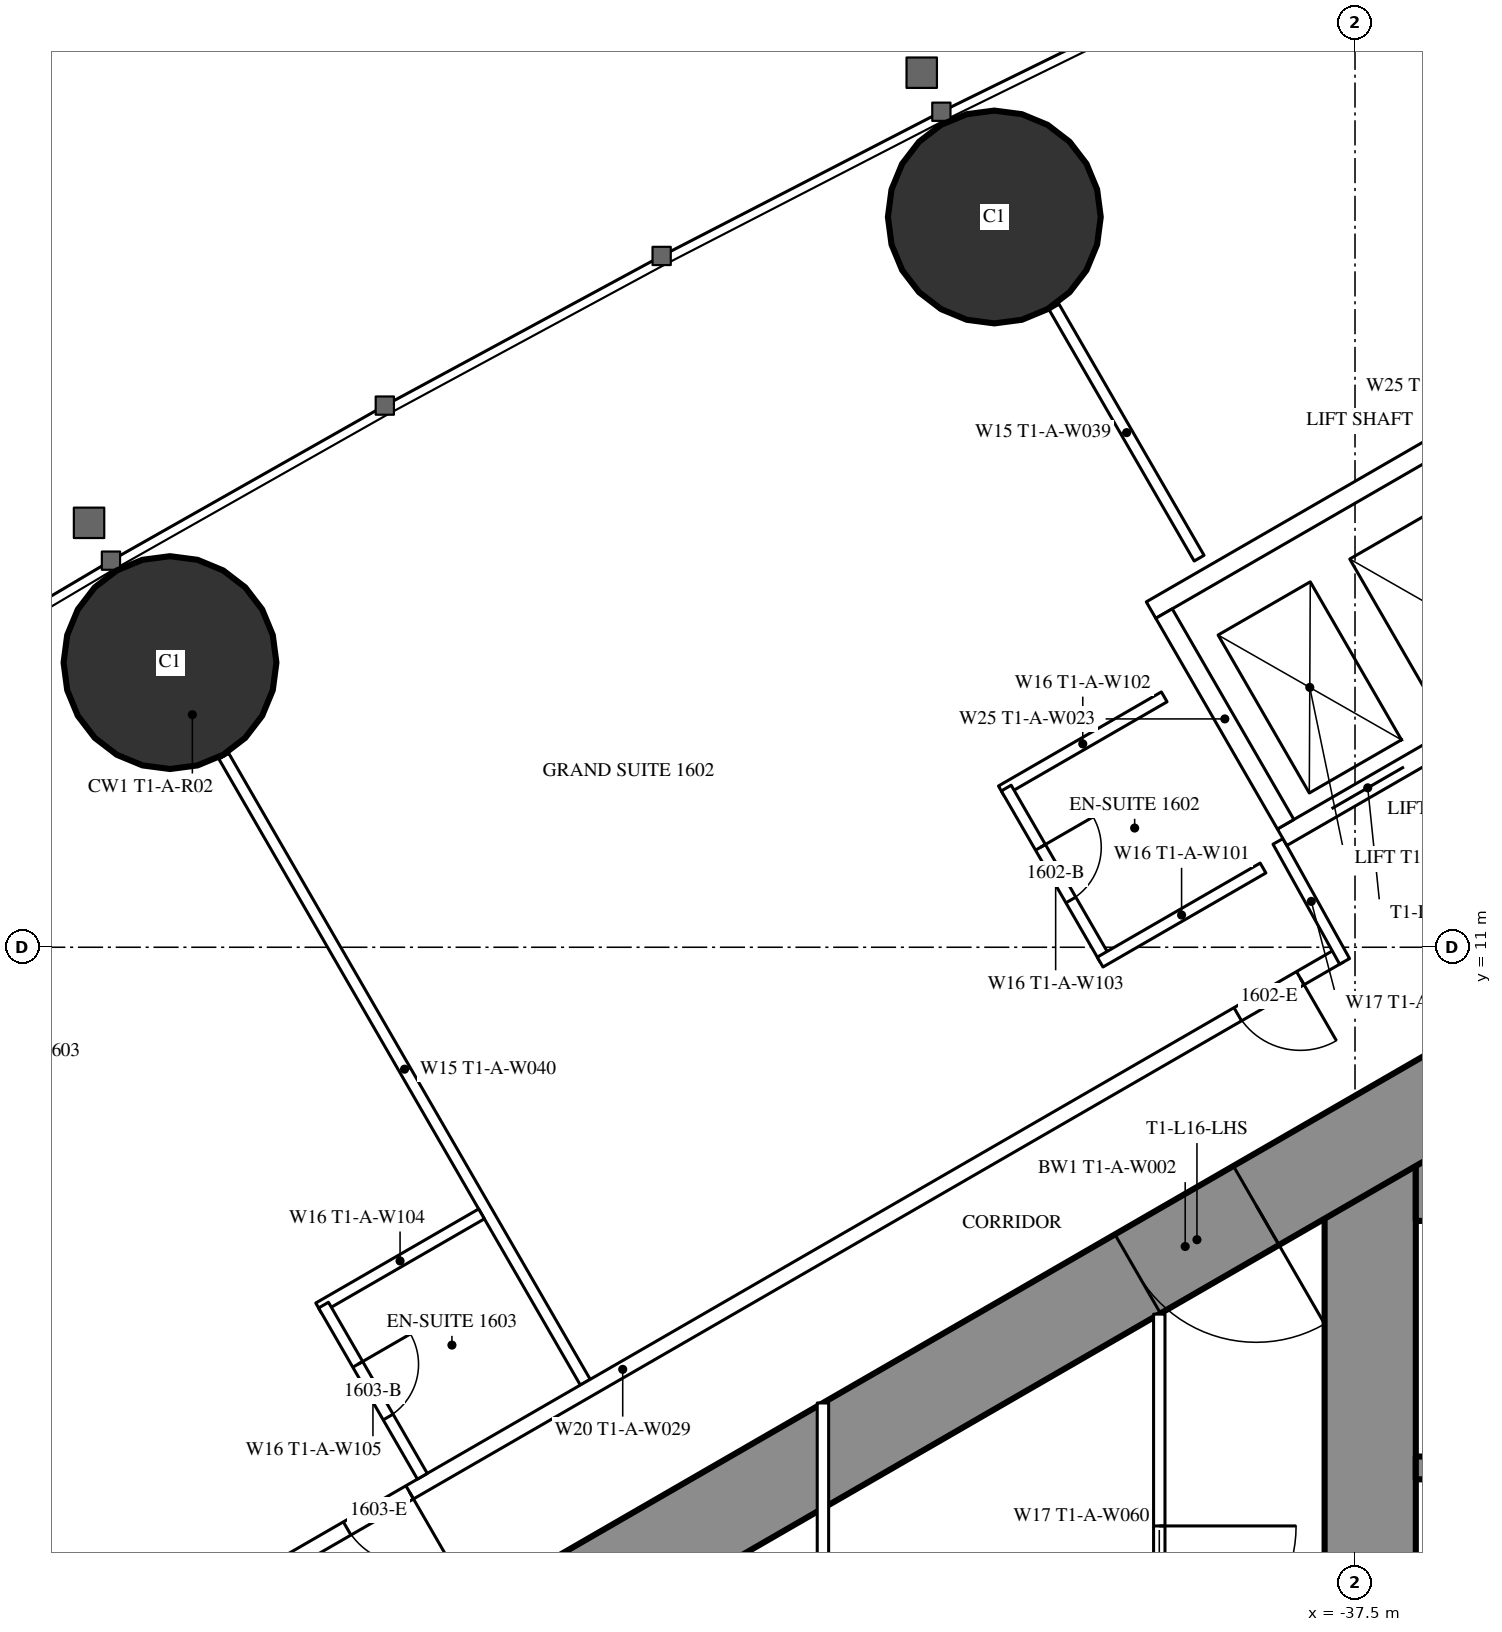
"""IFC4 building model, lengths in metres.
Left out: names, types, materials, properties, quantities, classifications, styles, units other than length and angle.
Written with IfcOpenShell. Run it as: python <this file> out.ifc"""

import sys

from ifc_helpers import new_model, si_unit, direction, frame, frame_2d, origin, origin_2d, place, context, subcontext, project, spatial, rectangle, hollow_circle, extrude, element, fill, save


model = new_model("IFC4")
c1 = context("Model", 3, precision=1e-05, world=origin(), true_north=direction((0.0, 1.0)))
c2 = subcontext(c1, "Body", "Model", "MODEL_VIEW")
j1 = project(units=[si_unit("LENGTHUNIT", "METRE"), si_unit("PLANEANGLEUNIT", "RADIAN")], contexts=[c1])
p1 = place(None, origin())
s1 = spatial("IfcSite", under=j1, at=p1, CompositionType="ELEMENT")
p2 = place(p1, origin())
s2 = spatial("IfcBuilding", under=s1, at=p2, CompositionType="ELEMENT")
p3 = place(p2, frame((0.0, 0.0, 63.5)))
s3 = spatial("IfcBuildingStorey", under=s2, at=p3, CompositionType="ELEMENT", Elevation=63.5)
for number, where, z_axis, x_axis in (
    (1, (-42.245, 20.607, 0.0), (0.0, 0.0, 1.0), (1.0, 0.0, 0.0)),
    (2, (-53.09, 14.745, 0.0), (0.0, 0.0, 1.0), (1.0, 0.0, 0.0)),
):
    element("IfcColumn", number, at=place(p3, frame(where, z_axis=z_axis, x_axis=x_axis)), inside=s3, PredefinedType="COLUMN", context=c2, shape_type="SweptSolid", body=[
        extrude(hollow_circle(Radius=1.4, WallThickness=0.12, at=origin_2d()), origin(), (0.0, 0.0, 1.0), 3.5),
    ])
p4 = place(p3, frame((-37.3, 8.6, 0.0), z_axis=(0.0, 0.0, 1.0), x_axis=(0.0, -1.0, 0.0)))
e3 = element("IfcWall", 3, at=p4, inside=s3, PredefinedType="SHEAR", context=c2, shape_type="SweptSolid", body=[
    extrude(rectangle(XDim=17.2, YDim=1.2, at=frame_2d((8.6, 0.0))), origin(), (0.0, 0.0, 1.0), 3.5),
])
p5 = place(p4, frame((7.7, 0.0, 0.0)))
e4 = element("IfcOpeningElement", 4, at=p5, cuts=e3, PredefinedType="OPENING", context=c2, shape_type="SweptSolid", body=[
    extrude(rectangle(XDim=1.8, YDim=2.2, at=frame_2d((0.9, 1.1))), frame((0.0, 0.61, 0.0), z_axis=(0.0, -1.0, 0.0), x_axis=(1.0, 0.0, 0.0)), (0.0, 0.0, 1.0), 1.22),
])
p6 = place(p3, frame((-28.3, 8.0, 0.0), z_axis=(0.0, 0.0, 1.0), x_axis=(-1.0, 0.0, 0.0)))
e5 = element("IfcWall", 5, at=p6, inside=s3, PredefinedType="SHEAR", context=c2, shape_type="SweptSolid", body=[
    extrude(rectangle(XDim=8.4, YDim=1.2, at=frame_2d((4.2, 0.0))), origin(), (0.0, 0.0, 1.0), 3.5),
])
p7 = place(p6, frame((0.25, 0.0, 0.0)))
e6 = element("IfcOpeningElement", 6, at=p7, cuts=e5, PredefinedType="OPENING", context=c2, shape_type="SweptSolid", body=[
    extrude(rectangle(XDim=1.0, YDim=2.2, at=frame_2d((0.5, 1.1))), frame((0.0, 0.61, 0.0), z_axis=(0.0, -1.0, 0.0), x_axis=(1.0, 0.0, 0.0)), (0.0, 0.0, 1.0), 1.22),
])
p8 = place(p3, frame((-28.3, 4.15, 0.0), z_axis=(0.0, 0.0, 1.0), x_axis=(-1.0, 0.0, 0.0)))
e7 = element("IfcWall", 7, at=p8, inside=s3, PredefinedType="SHEAR", context=c2, shape_type="SweptSolid", body=[
    extrude(rectangle(XDim=8.4, YDim=0.3, at=frame_2d((4.2, 0.0))), origin(), (0.0, 0.0, 1.0), 3.5),
])
p9 = place(p3, frame((-27.2, 14.3, 0.0), z_axis=(0.0, 0.0, 1.0), x_axis=(-0.866026593062, -0.499997940104, 0.0)))
e8 = element("IfcWall", 8, at=p9, inside=s3, PredefinedType="SHEAR", context=c2, shape_type="SweptSolid", body=[
    extrude(rectangle(XDim=28.946, YDim=1.2, at=frame_2d((14.473, 0.0))), origin(), (0.0, 0.0, 1.0), 3.5),
])
p10 = place(p9, frame((4.6, 0.0, 0.0)))
e9 = element("IfcOpeningElement", 9, at=p10, cuts=e8, PredefinedType="OPENING", context=c2, shape_type="SweptSolid", body=[
    extrude(rectangle(XDim=1.0, YDim=2.2, at=frame_2d((0.5, 1.1))), frame((0.0, 0.61, 0.0), z_axis=(0.0, -1.0, 0.0), x_axis=(1.0, 0.0, 0.0)), (0.0, 0.0, 1.0), 1.22),
])
p11 = place(p9, frame((13.395, 0.0, 0.0)))
e10 = element("IfcOpeningElement", 10, at=p11, cuts=e8, PredefinedType="OPENING", context=c2, shape_type="SweptSolid", body=[
    extrude(rectangle(XDim=1.8, YDim=2.2, at=frame_2d((0.9, 1.1))), frame((0.0, 0.61, 0.0), z_axis=(0.0, -1.0, 0.0), x_axis=(1.0, 0.0, 0.0)), (0.0, 0.0, 1.0), 1.22),
])
p12 = place(p3, frame((-47.627, 5.278, 0.0), z_axis=(0.0, 0.0, 1.0), x_axis=(-0.500009844318, 0.86601972009, 0.0)))
e11 = element("IfcWall", 11, at=p12, inside=s3, PredefinedType="PARTITIONING", context=c2, shape_type="SweptSolid", body=[
    extrude(rectangle(XDim=9.51, YDim=0.15, at=frame_2d((4.755, 0.0))), origin(), (0.0, 0.0, 1.0), 2.25),
])
p13 = place(p3, frame((-39.551, 16.119, 0.0), z_axis=(0.0, 0.0, 1.0), x_axis=(-0.500014214979, 0.866017196607, 0.0)))
e12 = element("IfcWall", 12, at=p13, inside=s3, PredefinedType="PARTITIONING", context=c2, shape_type="SweptSolid", body=[
    extrude(rectangle(XDim=3.815, YDim=0.15, at=frame_2d((1.907, 0.0))), origin(), (0.0, 0.0, 1.0), 3.25),
])
p14 = place(p3, frame((-37.7, 10.894, 0.0), z_axis=(0.0, 0.0, 1.0), x_axis=(-0.866027905338, -0.499995667157, 0.0)))
e13 = element("IfcWall", 13, at=p14, inside=s3, PredefinedType="PARTITIONING", context=c2, shape_type="SweptSolid", body=[
    extrude(rectangle(XDim=21.787, YDim=0.2, at=frame_2d((10.894, 0.0))), origin(), (0.0, 0.0, 1.0), 3.25),
])
p15 = place(p14, frame((14.13, 0.0, 0.0)))
e14 = element("IfcOpeningElement", 14, at=p15, cuts=e13, PredefinedType="OPENING", context=c2, shape_type="SweptSolid", body=[
    extrude(rectangle(XDim=0.95, YDim=2.2, at=frame_2d((0.475, 1.1))), frame((0.0, 0.11, 0.0), z_axis=(0.0, -1.0, 0.0), x_axis=(1.0, 0.0, 0.0)), (0.0, 0.0, 1.0), 0.22),
])
p16 = place(p14, frame((20.058, 0.0, 0.0)))
e15 = element("IfcOpeningElement", 15, at=p16, cuts=e13, PredefinedType="OPENING", context=c2, shape_type="SweptSolid", body=[
    extrude(rectangle(XDim=0.95, YDim=2.2, at=frame_2d((0.475, 1.1))), frame((0.0, 0.11, 0.0), z_axis=(0.0, -1.0, 0.0), x_axis=(1.0, 0.0, 0.0)), (0.0, 0.0, 1.0), 0.22),
])
p17 = place(p14, frame((0.6, 0.0, 0.0)))
e16 = element("IfcOpeningElement", 16, at=p17, cuts=e13, PredefinedType="OPENING", context=c2, shape_type="SweptSolid", body=[
    extrude(rectangle(XDim=0.95, YDim=2.2, at=frame_2d((0.475, 1.1))), frame((0.0, 0.11, 0.0), z_axis=(0.0, -1.0, 0.0), x_axis=(1.0, 0.0, 0.0)), (0.0, 0.0, 1.0), 0.22),
])
p18 = place(p3, frame((-38.513, 12.392, 0.0), z_axis=(0.0, 0.0, 1.0), x_axis=(0.485585508183, -0.874189175317, 0.0)))
e17 = element("IfcWall", 17, at=p18, inside=s3, PredefinedType="PARTITIONING", context=c2, shape_type="SweptSolid", body=[
    extrude(rectangle(XDim=1.805, YDim=0.15, at=frame_2d((0.902, 0.0))), origin(), (0.0, 0.0, 1.0), 3.25),
])
p19 = place(p3, frame((-48.992, 7.492, 0.0), z_axis=(0.0, 0.0, 1.0), x_axis=(-0.866031185235, -0.4999899861, 0.0)))
e18 = element("IfcWall", 18, at=p19, inside=s3, PredefinedType="PARTITIONING", context=c2, shape_type="SweptSolid", body=[
    extrude(rectangle(XDim=2.475, YDim=0.15, at=frame_2d((1.238, 0.0))), origin(), (0.0, 0.0, 1.0), 3.25),
])
p20 = place(p3, frame((-49.77, 4.04, 0.0), z_axis=(0.0, 0.0, 1.0), x_axis=(-0.500006934395, 0.866021400173, 0.0)))
e19 = element("IfcWall", 19, at=p20, inside=s3, PredefinedType="PARTITIONING", context=c2, shape_type="SweptSolid", body=[
    extrude(rectangle(XDim=2.6, YDim=0.15, at=frame_2d((1.3, 0.0))), origin(), (0.0, 0.0, 1.0), 3.25),
])
p21 = place(p20, frame((0.9, 0.0, 0.0)))
e20 = element("IfcOpeningElement", 20, at=p21, cuts=e19, PredefinedType="OPENING", context=c2, shape_type="SweptSolid", body=[
    extrude(rectangle(XDim=0.8, YDim=2.2, at=frame_2d((0.4, 1.1))), frame((0.0, 0.085, 0.0), z_axis=(0.0, -1.0, 0.0), x_axis=(1.0, 0.0, 0.0)), (0.0, 0.0, 1.0), 0.17),
])
p22 = place(p3, frame((-40.01, 14.294, 0.0), z_axis=(0.0, 0.0, 1.0), x_axis=(-0.866031185235, -0.4999899861, 0.0)))
e21 = element("IfcWall", 21, at=p22, inside=s3, PredefinedType="PARTITIONING", context=c2, shape_type="SweptSolid", body=[
    extrude(rectangle(XDim=2.475, YDim=0.15, at=frame_2d((1.238, 0.0))), origin(), (0.0, 0.0, 1.0), 3.25),
])
p23 = place(p3, frame((-40.788, 10.843, 0.0), z_axis=(0.0, 0.0, 1.0), x_axis=(-0.500006934395, 0.866021400173, 0.0)))
e22 = element("IfcWall", 22, at=p23, inside=s3, PredefinedType="PARTITIONING", context=c2, shape_type="SweptSolid", body=[
    extrude(rectangle(XDim=2.6, YDim=0.15, at=frame_2d((1.3, 0.0))), origin(), (0.0, 0.0, 1.0), 3.25),
])
p24 = place(p23, frame((0.9, 0.0, 0.0)))
e23 = element("IfcOpeningElement", 23, at=p24, cuts=e22, PredefinedType="OPENING", context=c2, shape_type="SweptSolid", body=[
    extrude(rectangle(XDim=0.8, YDim=2.2, at=frame_2d((0.4, 1.1))), frame((0.0, 0.085, 0.0), z_axis=(0.0, -1.0, 0.0), x_axis=(1.0, 0.0, 0.0)), (0.0, 0.0, 1.0), 0.17),
])
p25 = place(p3, frame((-38.71, 12.042, 0.0), z_axis=(0.0, 0.0, 1.0), x_axis=(-0.86604923931, -0.499958713387, 0.0)))
e24 = element("IfcWall", 24, at=p25, inside=s3, PredefinedType="PARTITIONING", context=c2, shape_type="SweptSolid", body=[
    extrude(rectangle(XDim=2.475, YDim=0.15, at=frame_2d((1.237, 0.0))), origin(), (0.0, 0.0, 1.0), 3.25),
])
p26 = place(p3, frame((-40.075, 6.174, 0.0), z_axis=(0.0, 0.0, 1.0), x_axis=(0.0, -1.0, 0.0)))
e25 = element("IfcWall", 25, at=p26, inside=s3, PredefinedType="PARTITIONING", context=c2, shape_type="SweptSolid", body=[
    extrude(rectangle(XDim=7.374, YDim=0.15, at=frame_2d((3.687, 0.0))), origin(), (0.0, 0.0, 1.0), 3.25),
])
p27 = place(p26, frame((2.787, 0.0, 0.0)))
e26 = element("IfcOpeningElement", 26, at=p27, cuts=e25, PredefinedType="OPENING", context=c2, shape_type="SweptSolid", body=[
    extrude(rectangle(XDim=1.8, YDim=2.2, at=frame_2d((0.9, 1.1))), frame((0.0, 0.085, 0.0), z_axis=(0.0, -1.0, 0.0), x_axis=(1.0, 0.0, 0.0)), (0.0, 0.0, 1.0), 0.17),
])
p28 = place(p3, frame((-44.5, 5.005, 0.0), z_axis=(0.0, 0.0, 1.0), x_axis=(0.0, -1.0, 0.0)))
e27 = element("IfcWall", 27, at=p28, inside=s3, PredefinedType="PARTITIONING", context=c2, shape_type="SweptSolid", body=[
    extrude(rectangle(XDim=10.009, YDim=0.15, at=frame_2d((5.005, 0.0))), origin(), (0.0, 0.0, 1.0), 2.45),
])
p29 = place(p28, frame((2.002, 0.0, 0.0)))
e28 = element("IfcOpeningElement", 28, at=p29, cuts=e27, PredefinedType="OPENING", context=c2, shape_type="SweptSolid", body=[
    extrude(rectangle(XDim=1.0, YDim=2.2, at=frame_2d((0.5, 1.1))), frame((0.0, 0.085, 0.0), z_axis=(0.0, -1.0, 0.0), x_axis=(1.0, 0.0, 0.0)), (0.0, 0.0, 1.0), 0.17),
])
p30 = place(p28, frame((7.007, 0.0, 0.0)))
e29 = element("IfcOpeningElement", 29, at=p30, cuts=e27, PredefinedType="OPENING", context=c2, shape_type="SweptSolid", body=[
    extrude(rectangle(XDim=1.0, YDim=2.2, at=frame_2d((0.5, 1.1))), frame((0.0, 0.085, 0.0), z_axis=(0.0, -1.0, 0.0), x_axis=(1.0, 0.0, 0.0)), (0.0, 0.0, 1.0), 0.17),
])
p31 = place(p3, frame((-31.01, 16.747, 0.0), z_axis=(0.0, 0.0, 1.0), x_axis=(-0.866028165386, -0.499995216735, 0.0)))
e30 = element("IfcWall", 30, at=p31, inside=s3, PredefinedType="PARTITIONING", context=c2, shape_type="SweptSolid", body=[
    extrude(rectangle(XDim=8.6, YDim=0.25, at=frame_2d((4.3, 0.0))), origin(), (0.0, 0.0, 1.0), 3.25),
])
p32 = place(p31, frame((0.75, 0.0, 0.0)))
e31 = element("IfcOpeningElement", 31, at=p32, cuts=e30, PredefinedType="OPENING", context=c2, shape_type="SweptSolid", body=[
    extrude(rectangle(XDim=1.1, YDim=2.2, at=frame_2d((0.55, 1.1))), frame((0.0, 0.135, 0.0), z_axis=(0.0, -1.0, 0.0), x_axis=(1.0, 0.0, 0.0)), (0.0, 0.0, 1.0), 0.27),
])
p33 = place(p31, frame((2.75, 0.0, 0.0)))
e32 = element("IfcOpeningElement", 32, at=p33, cuts=e30, PredefinedType="OPENING", context=c2, shape_type="SweptSolid", body=[
    extrude(rectangle(XDim=1.1, YDim=2.2, at=frame_2d((0.55, 1.1))), frame((0.0, 0.135, 0.0), z_axis=(0.0, -1.0, 0.0), x_axis=(1.0, 0.0, 0.0)), (0.0, 0.0, 1.0), 0.27),
])
p34 = place(p31, frame((4.75, 0.0, 0.0)))
e33 = element("IfcOpeningElement", 33, at=p34, cuts=e30, PredefinedType="OPENING", context=c2, shape_type="SweptSolid", body=[
    extrude(rectangle(XDim=1.1, YDim=2.2, at=frame_2d((0.55, 1.1))), frame((0.0, 0.135, 0.0), z_axis=(0.0, -1.0, 0.0), x_axis=(1.0, 0.0, 0.0)), (0.0, 0.0, 1.0), 0.27),
])
p35 = place(p31, frame((6.75, 0.0, 0.0)))
e34 = element("IfcOpeningElement", 34, at=p35, cuts=e30, PredefinedType="OPENING", context=c2, shape_type="SweptSolid", body=[
    extrude(rectangle(XDim=1.1, YDim=2.2, at=frame_2d((0.55, 1.1))), frame((0.0, 0.135, 0.0), z_axis=(0.0, -1.0, 0.0), x_axis=(1.0, 0.0, 0.0)), (0.0, 0.0, 1.0), 0.27),
])
p36 = place(p3, frame((-32.736, 19.736, 0.0), z_axis=(0.0, 0.0, 1.0), x_axis=(-0.866028165386, -0.499995216735, 0.0)))
e35 = element("IfcWall", 35, at=p36, inside=s3, PredefinedType="PARTITIONING", context=c2, shape_type="SweptSolid", body=[
    extrude(rectangle(XDim=8.6, YDim=0.25, at=frame_2d((4.3, 0.0))), origin(), (0.0, 0.0, 1.0), 3.25),
])
p37 = place(p3, frame((-38.413, 12.618, 0.0), z_axis=(0.0, 0.0, 1.0), x_axis=(-0.499872130319, 0.866099216793, 0.0)))
e36 = element("IfcWall", 36, at=p37, inside=s3, PredefinedType="PARTITIONING", context=c2, shape_type="SweptSolid", body=[
    extrude(rectangle(XDim=3.2, YDim=0.25, at=frame_2d((1.6, 0.0))), origin(), (0.0, 0.0, 1.0), 3.25),
])
p38 = place(p21, origin())
e37 = element("IfcDoor", 37, at=p38, inside=s3, OperationType="SINGLE_SWING_RIGHT", PredefinedType="DOOR", context=c2, shape_type="SweptSolid", body=[
    extrude(rectangle(XDim=0.8, YDim=2.2, at=frame_2d((0.4, 1.1))), frame((0.0, 0.025, 0.0), z_axis=(0.0, -1.0, 0.0), x_axis=(1.0, 0.0, 0.0)), (0.0, 0.0, 1.0), 0.05),
])
fill(e20, e37)
p39 = place(p15, origin())
e38 = element("IfcDoor", 38, at=p39, inside=s3, OperationType="SINGLE_SWING_LEFT", PredefinedType="DOOR", context=c2, shape_type="SweptSolid", body=[
    extrude(rectangle(XDim=0.95, YDim=2.2, at=frame_2d((0.475, 1.1))), frame((0.0, 0.025, 0.0), z_axis=(0.0, -1.0, 0.0), x_axis=(1.0, 0.0, 0.0)), (0.0, 0.0, 1.0), 0.05),
])
fill(e14, e38)
p40 = place(p24, origin())
e39 = element("IfcDoor", 39, at=p40, inside=s3, OperationType="SINGLE_SWING_RIGHT", PredefinedType="DOOR", context=c2, shape_type="SweptSolid", body=[
    extrude(rectangle(XDim=0.8, YDim=2.2, at=frame_2d((0.4, 1.1))), frame((0.0, 0.025, 0.0), z_axis=(0.0, -1.0, 0.0), x_axis=(1.0, 0.0, 0.0)), (0.0, 0.0, 1.0), 0.05),
])
fill(e23, e39)
p41 = place(p17, origin())
e40 = element("IfcDoor", 40, at=p41, inside=s3, OperationType="SINGLE_SWING_LEFT", PredefinedType="DOOR", context=c2, shape_type="SweptSolid", body=[
    extrude(rectangle(XDim=0.95, YDim=2.2, at=frame_2d((0.475, 1.1))), frame((0.0, 0.025, 0.0), z_axis=(0.0, -1.0, 0.0), x_axis=(1.0, 0.0, 0.0)), (0.0, 0.0, 1.0), 0.05),
])
fill(e16, e40)
p42 = place(p27, origin())
e41 = element("IfcDoor", 41, at=p42, inside=s3, OperationType="DOUBLE_DOOR_SINGLE_SWING", PredefinedType="DOOR", context=c2, shape_type="SweptSolid", body=[
    extrude(rectangle(XDim=1.8, YDim=2.2, at=frame_2d((0.9, 1.1))), frame((0.0, 0.025, 0.0), z_axis=(0.0, -1.0, 0.0), x_axis=(1.0, 0.0, 0.0)), (0.0, 0.0, 1.0), 0.05),
])
fill(e26, e41)
p43 = place(p11, origin())
e42 = element("IfcDoor", 42, at=p43, inside=s3, OperationType="DOUBLE_DOOR_SINGLE_SWING", PredefinedType="DOOR", context=c2, shape_type="SweptSolid", body=[
    extrude(rectangle(XDim=1.8, YDim=2.2, at=frame_2d((0.9, 1.1))), frame((0.0, 0.025, 0.0), z_axis=(0.0, -1.0, 0.0), x_axis=(1.0, 0.0, 0.0)), (0.0, 0.0, 1.0), 0.05),
])
fill(e10, e42)
p44 = place(p35, origin())
e43 = element("IfcDoor", 43, at=p44, inside=s3, OperationType="DOUBLE_DOOR_SLIDING", PredefinedType="USERDEFINED", context=c2, shape_type="SweptSolid", body=[
    extrude(rectangle(XDim=1.1, YDim=2.2, at=frame_2d((0.55, 1.1))), frame((0.0, 0.025, 0.0), z_axis=(0.0, -1.0, 0.0), x_axis=(1.0, 0.0, 0.0)), (0.0, 0.0, 1.0), 0.05),
])
fill(e34, e43)
save(model, sys.argv[1])
